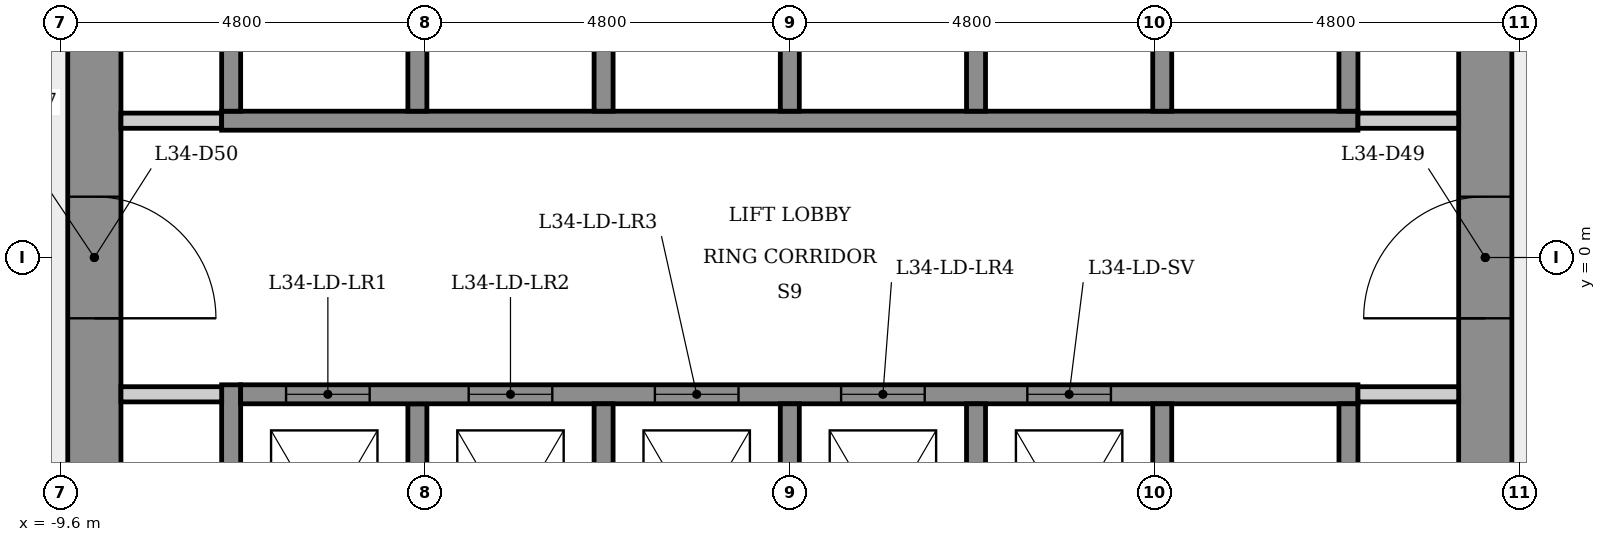
"""IFC4 building model, lengths in metres.
Left out: names, types, materials, properties, quantities, classifications, styles, units other than length and angle.
Written with IfcOpenShell. Run it as: python <this file> out.ifc"""

import sys

from ifc_helpers import new_model, si_unit, direction, frame, frame_2d, origin, place, context, subcontext, project, spatial, rectangle, extrude, element, fill, save


model = new_model("IFC4")
c1 = context("Model", 3, precision=1e-05, world=origin(), true_north=direction((0.0, 1.0)))
c2 = subcontext(c1, "Body", "Model", "MODEL_VIEW")
j1 = project(units=[si_unit("LENGTHUNIT", "METRE"), si_unit("PLANEANGLEUNIT", "RADIAN")], contexts=[c1])
p1 = place(None, origin())
s1 = spatial("IfcSite", under=j1, at=p1, CompositionType="ELEMENT")
p2 = place(p1, origin())
s2 = spatial("IfcBuilding", under=s1, at=p2, CompositionType="ELEMENT")
p3 = place(p2, frame((0.0, 0.0, 128.5)))
s3 = spatial("IfcBuildingStorey", under=s2, at=p3, CompositionType="ELEMENT", Elevation=128.5)
p4 = place(p3, frame((9.15, -5.485, 0.0), z_axis=(0.0, 0.0, 1.0), x_axis=(0.0, 1.0, 0.0)))
e1 = element("IfcWall", 1, at=p4, inside=s3, PredefinedType="SHEAR", context=c2, shape_type="SweptSolid", body=[
    extrude(rectangle(XDim=10.97, YDim=0.7, at=frame_2d((5.485, 0.0))), origin(), (0.0, 0.0, 1.0), 4.0),
])
p5 = place(p4, frame((4.685, 0.0, 0.0)))
e2 = element("IfcOpeningElement", 2, at=p5, cuts=e1, PredefinedType="OPENING", context=c2, shape_type="SweptSolid", body=[
    extrude(rectangle(XDim=1.6, YDim=2.1, at=frame_2d((0.8, 1.05))), frame((0.0, 0.36, 0.0), z_axis=(0.0, -1.0, 0.0), x_axis=(1.0, 0.0, 0.0)), (0.0, 0.0, 1.0), 0.72),
])
p6 = place(p3, frame((-9.15, 5.485, 0.0), z_axis=(0.0, 0.0, 1.0), x_axis=(0.0, -1.0, 0.0)))
e3 = element("IfcWall", 3, at=p6, inside=s3, PredefinedType="SHEAR", context=c2, shape_type="SweptSolid", body=[
    extrude(rectangle(XDim=10.97, YDim=0.7, at=frame_2d((5.485, 0.0))), origin(), (0.0, 0.0, 1.0), 4.0),
])
p7 = place(p6, frame((4.685, 0.0, 0.0)))
e4 = element("IfcOpeningElement", 4, at=p7, cuts=e3, PredefinedType="OPENING", context=c2, shape_type="SweptSolid", body=[
    extrude(rectangle(XDim=1.6, YDim=2.1, at=frame_2d((0.8, 1.05))), frame((0.0, 0.36, 0.0), z_axis=(0.0, -1.0, 0.0), x_axis=(1.0, 0.0, 0.0)), (0.0, 0.0, 1.0), 0.72),
])
p8 = place(p3, frame((-8.8, 1.8, 0.0), z_axis=(0.0, 0.0, 1.0), x_axis=(1.0, 0.0, 0.0)))
e5 = element("IfcWall", 5, at=p8, inside=s3, PredefinedType="PARTITIONING", context=c2, shape_type="SweptSolid", body=[
    extrude(rectangle(XDim=1.325, YDim=0.2, at=frame_2d((0.663, 0.0))), origin(), (0.0, 0.0, 1.0), 3.65),
])
p9 = place(p3, frame((-7.475, 1.8, 0.0), z_axis=(0.0, 0.0, 1.0), x_axis=(1.0, 0.0, 0.0)))
e6 = element("IfcWall", 6, at=p9, inside=s3, PredefinedType="SHEAR", context=c2, shape_type="SweptSolid", body=[
    extrude(rectangle(XDim=14.95, YDim=0.25, at=frame_2d((7.475, 0.0))), origin(), (0.0, 0.0, 1.0), 3.65),
])
p10 = place(p3, frame((-7.35, -5.846, 0.0), z_axis=(0.0, 0.0, 1.0), x_axis=(0.0, 1.0, 0.0)))
e7 = element("IfcWall", 7, at=p10, inside=s3, PredefinedType="SHEAR", context=c2, shape_type="SweptSolid", body=[
    extrude(rectangle(XDim=4.171, YDim=0.25, at=frame_2d((2.085, 0.0))), origin(), (0.0, 0.0, 1.0), 3.65),
])
p11 = place(p3, frame((-7.35, 1.925, 0.0), z_axis=(0.0, 0.0, 1.0), x_axis=(0.0, 1.0, 0.0)))
e8 = element("IfcWall", 8, at=p11, inside=s3, PredefinedType="SHEAR", context=c2, shape_type="SweptSolid", body=[
    extrude(rectangle(XDim=3.921, YDim=0.25, at=frame_2d((1.96, 0.0))), origin(), (0.0, 0.0, 1.0), 3.65),
])
p12 = place(p3, frame((-7.475, -1.8, 0.0), z_axis=(0.0, 0.0, 1.0), x_axis=(-1.0, 0.0, 0.0)))
e9 = element("IfcWall", 9, at=p12, inside=s3, PredefinedType="PARTITIONING", context=c2, shape_type="SweptSolid", body=[
    extrude(rectangle(XDim=1.325, YDim=0.2, at=frame_2d((0.663, 0.0))), origin(), (0.0, 0.0, 1.0), 3.65),
])
for number, where, z_axis, x_axis in (
    (10, (-4.9, -1.925, 0.0), (0.0, 0.0, 1.0), (0.0, -1.0, 0.0)),
    (11, (-4.9, 5.025, 0.0), (0.0, 0.0, 1.0), (0.0, -1.0, 0.0)),
):
    element("IfcWall", number, at=place(p3, frame(where, z_axis=z_axis, x_axis=x_axis)), inside=s3, PredefinedType="SHEAR", context=c2, shape_type="SweptSolid", body=[
        extrude(rectangle(XDim=3.1, YDim=0.25, at=frame_2d((1.55, 0.0))), origin(), (0.0, 0.0, 1.0), 4.0),
    ])
p13 = place(p3, frame((-7.225, -1.8, 0.0), z_axis=(0.0, 0.0, 1.0), x_axis=(1.0, 0.0, 0.0)))
e12 = element("IfcWall", 12, at=p13, inside=s3, PredefinedType="SHEAR", context=c2, shape_type="SweptSolid", body=[
    extrude(rectangle(XDim=14.7, YDim=0.25, at=frame_2d((7.35, 0.0))), origin(), (0.0, 0.0, 1.0), 3.65),
])
p14 = place(p13, frame((0.597, 0.0, 0.0)))
e13 = element("IfcOpeningElement", 13, at=p14, cuts=e12, PredefinedType="OPENING", context=c2, shape_type="SweptSolid", body=[
    extrude(rectangle(XDim=1.1, YDim=2.1, at=frame_2d((0.55, 1.05))), frame((0.0, 0.135, 0.0), z_axis=(0.0, -1.0, 0.0), x_axis=(1.0, 0.0, 0.0)), (0.0, 0.0, 1.0), 0.27),
])
p15 = place(p13, frame((3.0, 0.0, 0.0)))
e14 = element("IfcOpeningElement", 14, at=p15, cuts=e12, PredefinedType="OPENING", context=c2, shape_type="SweptSolid", body=[
    extrude(rectangle(XDim=1.1, YDim=2.1, at=frame_2d((0.55, 1.05))), frame((0.0, 0.135, 0.0), z_axis=(0.0, -1.0, 0.0), x_axis=(1.0, 0.0, 0.0)), (0.0, 0.0, 1.0), 0.27),
])
p16 = place(p13, frame((5.45, 0.0, 0.0)))
e15 = element("IfcOpeningElement", 15, at=p16, cuts=e12, PredefinedType="OPENING", context=c2, shape_type="SweptSolid", body=[
    extrude(rectangle(XDim=1.1, YDim=2.1, at=frame_2d((0.55, 1.05))), frame((0.0, 0.135, 0.0), z_axis=(0.0, -1.0, 0.0), x_axis=(1.0, 0.0, 0.0)), (0.0, 0.0, 1.0), 0.27),
])
p17 = place(p13, frame((7.9, 0.0, 0.0)))
e16 = element("IfcOpeningElement", 16, at=p17, cuts=e12, PredefinedType="OPENING", context=c2, shape_type="SweptSolid", body=[
    extrude(rectangle(XDim=1.1, YDim=2.1, at=frame_2d((0.55, 1.05))), frame((0.0, 0.135, 0.0), z_axis=(0.0, -1.0, 0.0), x_axis=(1.0, 0.0, 0.0)), (0.0, 0.0, 1.0), 0.27),
])
p18 = place(p13, frame((10.35, 0.0, 0.0)))
e17 = element("IfcOpeningElement", 17, at=p18, cuts=e12, PredefinedType="OPENING", context=c2, shape_type="SweptSolid", body=[
    extrude(rectangle(XDim=1.1, YDim=2.1, at=frame_2d((0.55, 1.05))), frame((0.0, 0.135, 0.0), z_axis=(0.0, -1.0, 0.0), x_axis=(1.0, 0.0, 0.0)), (0.0, 0.0, 1.0), 0.27),
])
for number, where, z_axis, x_axis in (
    (18, (-2.45, -1.925, 0.0), (0.0, 0.0, 1.0), (0.0, -1.0, 0.0)),
    (19, (-2.45, 5.025, 0.0), (0.0, 0.0, 1.0), (0.0, -1.0, 0.0)),
    (20, (0.0, -1.925, 0.0), (0.0, 0.0, 1.0), (0.0, -1.0, 0.0)),
    (21, (0.0, 5.025, 0.0), (0.0, 0.0, 1.0), (0.0, -1.0, 0.0)),
    (22, (2.45, -1.925, 0.0), (0.0, 0.0, 1.0), (0.0, -1.0, 0.0)),
    (23, (2.45, 5.025, 0.0), (0.0, 0.0, 1.0), (0.0, -1.0, 0.0)),
    (24, (4.9, -1.925, 0.0), (0.0, 0.0, 1.0), (0.0, -1.0, 0.0)),
    (25, (4.9, 5.025, 0.0), (0.0, 0.0, 1.0), (0.0, -1.0, 0.0)),
):
    element("IfcWall", number, at=place(p3, frame(where, z_axis=z_axis, x_axis=x_axis)), inside=s3, PredefinedType="SHEAR", context=c2, shape_type="SweptSolid", body=[
        extrude(rectangle(XDim=3.1, YDim=0.25, at=frame_2d((1.55, 0.0))), origin(), (0.0, 0.0, 1.0), 4.0),
    ])
p19 = place(p3, frame((7.475, 1.8, 0.0), z_axis=(0.0, 0.0, 1.0), x_axis=(1.0, 0.0, 0.0)))
e26 = element("IfcWall", 26, at=p19, inside=s3, PredefinedType="PARTITIONING", context=c2, shape_type="SweptSolid", body=[
    extrude(rectangle(XDim=1.325, YDim=0.2, at=frame_2d((0.663, 0.0))), origin(), (0.0, 0.0, 1.0), 3.65),
])
for number, where, z_axis, x_axis in (
    (27, (7.35, -1.925, 0.0), (0.0, 0.0, 1.0), (0.0, -1.0, 0.0)),
    (28, (7.35, 5.025, 0.0), (0.0, 0.0, 1.0), (0.0, -1.0, 0.0)),
):
    element("IfcWall", number, at=place(p3, frame(where, z_axis=z_axis, x_axis=x_axis)), inside=s3, PredefinedType="SHEAR", context=c2, shape_type="SweptSolid", body=[
        extrude(rectangle(XDim=3.1, YDim=0.25, at=frame_2d((1.55, 0.0))), origin(), (0.0, 0.0, 1.0), 4.0),
    ])
p20 = place(p3, frame((8.8, -1.8, 0.0), z_axis=(0.0, 0.0, 1.0), x_axis=(-1.0, 0.0, 0.0)))
e29 = element("IfcWall", 29, at=p20, inside=s3, PredefinedType="PARTITIONING", context=c2, shape_type="SweptSolid", body=[
    extrude(rectangle(XDim=1.325, YDim=0.2, at=frame_2d((0.663, 0.0))), origin(), (0.0, 0.0, 1.0), 3.65),
])
p21 = place(p14, origin())
e30 = element("IfcDoor", 30, at=p21, inside=s3, OperationType="SLIDING_TO_LEFT", PredefinedType="DOOR", context=c2, shape_type="SweptSolid", body=[
    extrude(rectangle(XDim=1.1, YDim=2.1, at=frame_2d((0.55, 1.05))), frame((0.0, 0.025, 0.0), z_axis=(0.0, -1.0, 0.0), x_axis=(1.0, 0.0, 0.0)), (0.0, 0.0, 1.0), 0.05),
])
fill(e13, e30)
p22 = place(p15, origin())
e31 = element("IfcDoor", 31, at=p22, inside=s3, OperationType="SLIDING_TO_LEFT", PredefinedType="DOOR", context=c2, shape_type="SweptSolid", body=[
    extrude(rectangle(XDim=1.1, YDim=2.1, at=frame_2d((0.55, 1.05))), frame((0.0, 0.025, 0.0), z_axis=(0.0, -1.0, 0.0), x_axis=(1.0, 0.0, 0.0)), (0.0, 0.0, 1.0), 0.05),
])
fill(e14, e31)
p23 = place(p16, origin())
e32 = element("IfcDoor", 32, at=p23, inside=s3, OperationType="SLIDING_TO_LEFT", PredefinedType="DOOR", context=c2, shape_type="SweptSolid", body=[
    extrude(rectangle(XDim=1.1, YDim=2.1, at=frame_2d((0.55, 1.05))), frame((0.0, 0.025, 0.0), z_axis=(0.0, -1.0, 0.0), x_axis=(1.0, 0.0, 0.0)), (0.0, 0.0, 1.0), 0.05),
])
fill(e15, e32)
p24 = place(p17, origin())
e33 = element("IfcDoor", 33, at=p24, inside=s3, OperationType="SLIDING_TO_LEFT", PredefinedType="DOOR", context=c2, shape_type="SweptSolid", body=[
    extrude(rectangle(XDim=1.1, YDim=2.1, at=frame_2d((0.55, 1.05))), frame((0.0, 0.025, 0.0), z_axis=(0.0, -1.0, 0.0), x_axis=(1.0, 0.0, 0.0)), (0.0, 0.0, 1.0), 0.05),
])
fill(e16, e33)
p25 = place(p18, origin())
e34 = element("IfcDoor", 34, at=p25, inside=s3, OperationType="SLIDING_TO_LEFT", PredefinedType="DOOR", context=c2, shape_type="SweptSolid", body=[
    extrude(rectangle(XDim=1.1, YDim=2.1, at=frame_2d((0.55, 1.05))), frame((0.0, 0.025, 0.0), z_axis=(0.0, -1.0, 0.0), x_axis=(1.0, 0.0, 0.0)), (0.0, 0.0, 1.0), 0.05),
])
fill(e17, e34)
p26 = place(p5, origin())
e35 = element("IfcDoor", 35, at=p26, inside=s3, OperationType="SINGLE_SWING_LEFT", PredefinedType="DOOR", context=c2, shape_type="SweptSolid", body=[
    extrude(rectangle(XDim=1.6, YDim=2.1, at=frame_2d((0.8, 1.05))), frame((0.0, 0.025, 0.0), z_axis=(0.0, -1.0, 0.0), x_axis=(1.0, 0.0, 0.0)), (0.0, 0.0, 1.0), 0.05),
])
fill(e2, e35)
p27 = place(p7, origin())
e36 = element("IfcDoor", 36, at=p27, inside=s3, OperationType="SINGLE_SWING_RIGHT", PredefinedType="DOOR", context=c2, shape_type="SweptSolid", body=[
    extrude(rectangle(XDim=1.6, YDim=2.1, at=frame_2d((0.8, 1.05))), frame((0.0, 0.025, 0.0), z_axis=(0.0, -1.0, 0.0), x_axis=(1.0, 0.0, 0.0)), (0.0, 0.0, 1.0), 0.05),
])
fill(e4, e36)
save(model, sys.argv[1])
